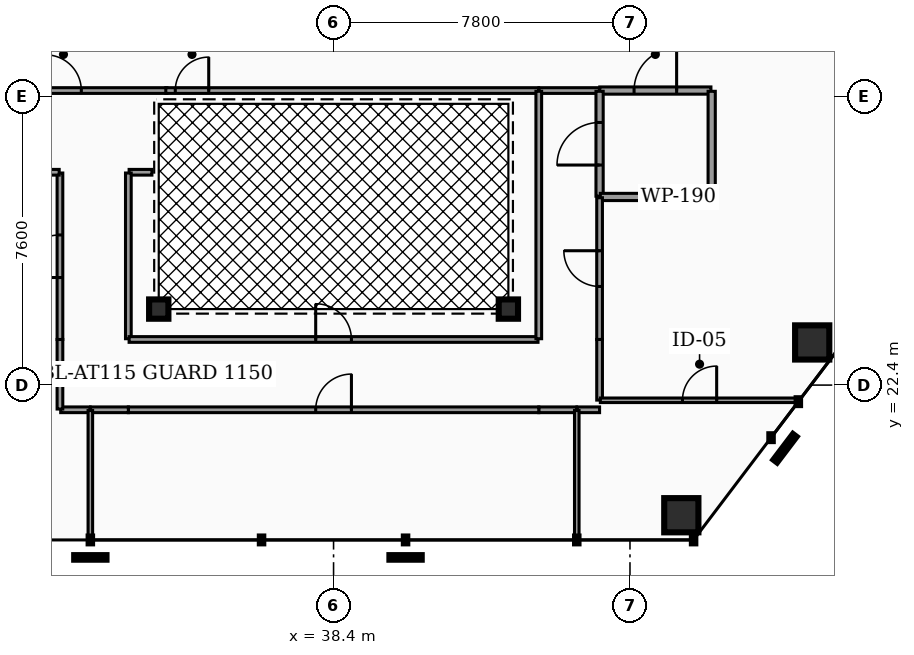
"""IFC4 building model, lengths in metres.
Left out: names, types, materials, properties, quantities, classifications, styles, units other than length and angle.
Written with IfcOpenShell. Run it as: python <this file> out.ifc"""

import sys

from ifc_helpers import new_model, si_unit, direction, frame, frame_2d, origin, origin_2d, place, context, subcontext, project, spatial, rectangle, hollow_rectangle, hollow_circle, extrude, element, fill, save


model = new_model("IFC4")
c1 = context("Model", 3, precision=1e-05, world=origin(), true_north=direction((0.0, 1.0)))
c2 = subcontext(c1, "Body", "Model", "MODEL_VIEW")
j1 = project(units=[si_unit("LENGTHUNIT", "METRE"), si_unit("PLANEANGLEUNIT", "RADIAN")], contexts=[c1])
p1 = place(None, origin())
s1 = spatial("IfcSite", under=j1, at=p1, CompositionType="ELEMENT")
p2 = place(p1, origin())
s2 = spatial("IfcBuilding", under=s1, at=p2, CompositionType="ELEMENT")
p3 = place(p2, frame((0.0, 0.0, 105.06)))
s3 = spatial("IfcBuildingStorey", under=s2, at=p3, CompositionType="ELEMENT", Elevation=105.06)
p4 = place(p3, frame((47.551, 18.976, 0.0), z_axis=(-0.08809338944, -0.03544586084, 0.995481363807), x_axis=(0.37328281943, -0.927717595348, 0.0)))
e1 = element("IfcColumn", 1, at=p4, inside=s3, PredefinedType="COLUMN", context=c2, shape_type="SweptSolid", body=[
    extrude(hollow_rectangle(XDim=0.9, YDim=0.9, WallThickness=0.045, at=origin_2d()), origin(), (0.0, 0.0, 1.0), 3.747),
])
p5 = place(p3, frame((50.995, 23.522, 0.0), z_axis=(-0.060564048009, 0.001306667702, 0.998163457911), x_axis=(-0.02156995343, -0.99976734149, 0.0)))
e2 = element("IfcColumn", 2, at=p5, inside=s3, PredefinedType="COLUMN", context=c2, shape_type="SweptSolid", body=[
    extrude(hollow_rectangle(XDim=0.9, YDim=0.9, WallThickness=0.045, at=origin_2d()), origin(), (0.0, 0.0, 1.0), 3.737),
])
for number, where, z_axis, x_axis in (
    (3, (33.8, 24.4, 0.0), (0.0, 0.0, 1.0), (1.0, 0.0, 0.0)),
    (4, (43.0, 24.4, 0.0), (0.0, 0.0, 1.0), (1.0, 0.0, 0.0)),
):
    element("IfcColumn", number, at=place(p3, frame(where, z_axis=z_axis, x_axis=x_axis)), inside=s3, PredefinedType="COLUMN", context=c2, shape_type="SweptSolid", body=[
        extrude(hollow_circle(Radius=0.254, WallThickness=0.02, at=origin_2d()), origin(), (0.0, 0.0, 1.0), 3.73),
    ])
p6 = place(p3, frame((45.405, 30.15, 0.0), z_axis=(0.0, 0.0, 1.0), x_axis=(1.0, 0.0, 0.0)))
e5 = element("IfcWall", 5, at=p6, inside=s3, PredefinedType="PARTITIONING", context=c2, shape_type="SweptSolid", body=[
    extrude(rectangle(XDim=2.925, YDim=0.19, at=frame_2d((1.462, 0.0))), origin(), (0.0, 0.0, 1.0), 2.687),
])
p7 = place(p6, frame((0.903, 0.0, 0.0)))
e6 = element("IfcOpeningElement", 6, at=p7, cuts=e5, PredefinedType="OPENING", context=c2, shape_type="SweptSolid", body=[
    extrude(rectangle(XDim=1.12, YDim=2.05, at=frame_2d((0.56, 1.025))), frame((0.0, 0.105, 0.0), z_axis=(0.0, -1.0, 0.0), x_axis=(1.0, 0.0, 0.0)), (0.0, 0.0, 1.0), 0.21),
])
p8 = place(p3, frame((43.805, 30.15, 0.0), z_axis=(0.0, 0.0, 1.0), x_axis=(1.0, 0.0, 0.0)))
e7 = element("IfcWall", 7, at=p8, inside=s3, PredefinedType="PARTITIONING", context=c2, shape_type="SweptSolid", body=[
    extrude(rectangle(XDim=1.59, YDim=0.15, at=frame_2d((0.795, 0.0))), origin(), (0.0, 0.0, 1.0), 2.687),
])
p9 = place(p3, frame((28.57, 30.15, 0.0), z_axis=(0.0, 0.0, 1.0), x_axis=(1.0, 0.0, 0.0)))
e8 = element("IfcWall", 8, at=p9, inside=s3, PredefinedType="PARTITIONING", context=c2, shape_type="SweptSolid", body=[
    extrude(rectangle(XDim=5.445, YDim=0.15, at=frame_2d((2.722, 0.0))), origin(), (0.0, 0.0, 1.0), 2.687),
])
p10 = place(p9, frame((2.252, 0.0, 0.0)))
e9 = element("IfcOpeningElement", 9, at=p10, cuts=e8, PredefinedType="OPENING", context=c2, shape_type="SweptSolid", body=[
    extrude(rectangle(XDim=0.94, YDim=2.05, at=frame_2d((0.47, 1.025))), frame((0.0, 0.085, 0.0), z_axis=(0.0, -1.0, 0.0), x_axis=(1.0, 0.0, 0.0)), (0.0, 0.0, 1.0), 0.17),
])
p11 = place(p3, frame((33.985, 30.15, 0.0), z_axis=(0.0, 0.0, 1.0), x_axis=(1.0, 0.0, 0.0)))
e10 = element("IfcWall", 10, at=p11, inside=s3, PredefinedType="PARTITIONING", context=c2, shape_type="SweptSolid", body=[
    extrude(rectangle(XDim=9.81, YDim=0.15, at=frame_2d((4.905, 0.0))), origin(), (0.0, 0.0, 1.0), 2.687),
])
p12 = place(p11, frame((0.25, 0.0, 0.0)))
e11 = element("IfcOpeningElement", 11, at=p12, cuts=e10, PredefinedType="OPENING", context=c2, shape_type="SweptSolid", body=[
    extrude(rectangle(XDim=0.88, YDim=2.05, at=frame_2d((0.44, 1.025))), frame((0.0, 0.085, 0.0), z_axis=(0.0, -1.0, 0.0), x_axis=(1.0, 0.0, 0.0)), (0.0, 0.0, 1.0), 0.17),
])
p13 = place(p3, frame((45.4, 27.37, 0.0), z_axis=(0.0, 0.0, 1.0), x_axis=(0.0, 1.0, 0.0)))
e12 = element("IfcWall", 12, at=p13, inside=s3, PredefinedType="PARTITIONING", context=c2, shape_type="SweptSolid", body=[
    extrude(rectangle(XDim=2.76, YDim=0.19, at=frame_2d((1.38, 0.0))), origin(), (0.0, 0.0, 1.0), 2.687),
])
p14 = place(p13, frame((0.82, 0.0, 0.0)))
e13 = element("IfcOpeningElement", 13, at=p14, cuts=e12, PredefinedType="OPENING", context=c2, shape_type="SweptSolid", body=[
    extrude(rectangle(XDim=1.12, YDim=2.05, at=frame_2d((0.56, 1.025))), frame((0.0, 0.105, 0.0), z_axis=(0.0, -1.0, 0.0), x_axis=(1.0, 0.0, 0.0)), (0.0, 0.0, 1.0), 0.21),
])
p15 = place(p3, frame((45.42, 27.35, 0.0), z_axis=(0.0, 0.0, 1.0), x_axis=(1.0, 0.0, 0.0)))
e14 = element("IfcWall", 14, at=p15, inside=s3, PredefinedType="PARTITIONING", context=c2, shape_type="SweptSolid", body=[
    extrude(rectangle(XDim=2.91, YDim=0.19, at=frame_2d((1.455, 0.0))), origin(), (0.0, 0.0, 1.0), 2.687),
])
p16 = place(p3, frame((48.35, 27.37, 0.0), z_axis=(0.0, 0.0, 1.0), x_axis=(0.0, 1.0, 0.0)))
e15 = element("IfcWall", 15, at=p16, inside=s3, PredefinedType="PARTITIONING", context=c2, shape_type="SweptSolid", body=[
    extrude(rectangle(XDim=2.76, YDim=0.19, at=frame_2d((1.38, 0.0))), origin(), (0.0, 0.0, 1.0), 2.687),
])
p17 = place(p3, frame((43.8, 21.75, 0.0), z_axis=(0.0, 0.0, 1.0), x_axis=(1.0, 0.0, 0.0)))
e16 = element("IfcWall", 16, at=p17, inside=s3, PredefinedType="PARTITIONING", context=c2, shape_type="SweptSolid", body=[
    extrude(rectangle(XDim=0.995, YDim=0.15, at=frame_2d((0.498, 0.0))), origin(), (0.0, 0.0, 1.0), 2.687),
])
p18 = place(p3, frame((33.0, 21.75, 0.0), z_axis=(0.0, 0.0, 1.0), x_axis=(1.0, 0.0, 0.0)))
e17 = element("IfcWall", 17, at=p18, inside=s3, PredefinedType="PARTITIONING", context=c2, shape_type="SweptSolid", body=[
    extrude(rectangle(XDim=10.8, YDim=0.15, at=frame_2d((5.4, 0.0))), origin(), (0.0, 0.0, 1.0), 2.687),
])
p19 = place(p18, frame((4.93, 0.0, 0.0)))
e18 = element("IfcOpeningElement", 18, at=p19, cuts=e17, PredefinedType="OPENING", context=c2, shape_type="SweptSolid", body=[
    extrude(rectangle(XDim=0.94, YDim=2.05, at=frame_2d((0.47, 1.025))), frame((0.0, 0.085, 0.0), z_axis=(0.0, -1.0, 0.0), x_axis=(1.0, 0.0, 0.0)), (0.0, 0.0, 1.0), 0.17),
])
p20 = place(p3, frame((32.005, 21.75, 0.0), z_axis=(0.0, 0.0, 1.0), x_axis=(1.0, 0.0, 0.0)))
e19 = element("IfcWall", 19, at=p20, inside=s3, PredefinedType="PARTITIONING", context=c2, shape_type="SweptSolid", body=[
    extrude(rectangle(XDim=0.995, YDim=0.15, at=frame_2d((0.498, 0.0))), origin(), (0.0, 0.0, 1.0), 2.687),
])
p21 = place(p3, frame((44.805, 21.75, 0.0), z_axis=(0.0, 0.0, 1.0), x_axis=(1.0, 0.0, 0.0)))
e20 = element("IfcWall", 20, at=p21, inside=s3, PredefinedType="PARTITIONING", context=c2, shape_type="SweptSolid", body=[
    extrude(rectangle(XDim=0.595, YDim=0.15, at=frame_2d((0.297, 0.0))), origin(), (0.0, 0.0, 1.0), 2.687),
])
p22 = place(p3, frame((31.22, 21.75, 0.0), z_axis=(0.0, 0.0, 1.0), x_axis=(1.0, 0.0, 0.0)))
e21 = element("IfcWall", 21, at=p22, inside=s3, PredefinedType="PARTITIONING", context=c2, shape_type="SweptSolid", body=[
    extrude(rectangle(XDim=0.775, YDim=0.15, at=frame_2d((0.388, 0.0))), origin(), (0.0, 0.0, 1.0), 2.687),
])
p23 = place(p3, frame((31.2, 21.77, 0.0), z_axis=(0.0, 0.0, 1.0), x_axis=(0.0, 1.0, 0.0)))
e22 = element("IfcWall", 22, at=p23, inside=s3, PredefinedType="PARTITIONING", context=c2, shape_type="SweptSolid", body=[
    extrude(rectangle(XDim=1.83, YDim=0.15, at=frame_2d((0.915, 0.0))), origin(), (0.0, 0.0, 1.0), 2.687),
])
p24 = place(p3, frame((31.2, 23.6, 0.0), z_axis=(0.0, 0.0, 1.0), x_axis=(0.0, 1.0, 0.0)))
e23 = element("IfcWall", 23, at=p24, inside=s3, PredefinedType="PARTITIONING", context=c2, shape_type="SweptSolid", body=[
    extrude(rectangle(XDim=4.38, YDim=0.15, at=frame_2d((2.19, 0.0))), origin(), (0.0, 0.0, 1.0), 2.687),
])
p25 = place(p24, frame((1.63, 0.0, 0.0)))
e24 = element("IfcOpeningElement", 24, at=p25, cuts=e23, PredefinedType="OPENING", context=c2, shape_type="SweptSolid", body=[
    extrude(rectangle(XDim=1.12, YDim=2.05, at=frame_2d((0.56, 1.025))), frame((0.0, 0.085, 0.0), z_axis=(0.0, -1.0, 0.0), x_axis=(1.0, 0.0, 0.0)), (0.0, 0.0, 1.0), 0.17),
])
p26 = place(p3, frame((28.55, 28.0, 0.0), z_axis=(0.0, 0.0, 1.0), x_axis=(1.0, 0.0, 0.0)))
e25 = element("IfcWall", 25, at=p26, inside=s3, PredefinedType="PARTITIONING", context=c2, shape_type="SweptSolid", body=[
    extrude(rectangle(XDim=2.63, YDim=0.15, at=frame_2d((1.315, 0.0))), origin(), (0.0, 0.0, 1.0), 2.687),
])
p27 = place(p3, frame((45.4, 23.6, 0.0), z_axis=(0.0, 0.0, 1.0), x_axis=(0.0, 1.0, 0.0)))
e26 = element("IfcWall", 26, at=p27, inside=s3, PredefinedType="PARTITIONING", context=c2, shape_type="SweptSolid", body=[
    extrude(rectangle(XDim=3.73, YDim=0.15, at=frame_2d((1.865, 0.0))), origin(), (0.0, 0.0, 1.0), 2.687),
])
p28 = place(p27, frame((1.395, 0.0, 0.0)))
e27 = element("IfcOpeningElement", 27, at=p28, cuts=e26, PredefinedType="OPENING", context=c2, shape_type="SweptSolid", body=[
    extrude(rectangle(XDim=0.94, YDim=2.05, at=frame_2d((0.47, 1.025))), frame((0.0, 0.085, 0.0), z_axis=(0.0, -1.0, 0.0), x_axis=(1.0, 0.0, 0.0)), (0.0, 0.0, 1.0), 0.17),
])
p29 = place(p3, frame((45.4, 22.005, 0.0), z_axis=(0.0, 0.0, 1.0), x_axis=(0.0, 1.0, 0.0)))
e28 = element("IfcWall", 28, at=p29, inside=s3, PredefinedType="PARTITIONING", context=c2, shape_type="SweptSolid", body=[
    extrude(rectangle(XDim=1.595, YDim=0.15, at=frame_2d((0.798, 0.0))), origin(), (0.0, 0.0, 1.0), 2.687),
])
p30 = place(p3, frame((33.02, 28.0, 0.0), z_axis=(0.0, 0.0, 1.0), x_axis=(1.0, 0.0, 0.0)))
e29 = element("IfcWall", 29, at=p30, inside=s3, PredefinedType="PARTITIONING", context=c2, shape_type="SweptSolid", body=[
    extrude(rectangle(XDim=0.6, YDim=0.15, at=frame_2d((0.3, 0.0))), origin(), (0.0, 0.0, 1.0), 2.687),
])
p31 = place(p3, frame((33.0, 23.62, 0.0), z_axis=(0.0, 0.0, 1.0), x_axis=(0.0, 1.0, 0.0)))
e30 = element("IfcWall", 30, at=p31, inside=s3, PredefinedType="PARTITIONING", context=c2, shape_type="SweptSolid", body=[
    extrude(rectangle(XDim=4.36, YDim=0.15, at=frame_2d((2.18, 0.0))), origin(), (0.0, 0.0, 1.0), 2.687),
])
p32 = place(p3, frame((33.02, 23.6, 0.0), z_axis=(0.0, 0.0, 1.0), x_axis=(1.0, 0.0, 0.0)))
e31 = element("IfcWall", 31, at=p32, inside=s3, PredefinedType="PARTITIONING", context=c2, shape_type="SweptSolid", body=[
    extrude(rectangle(XDim=10.76, YDim=0.15, at=frame_2d((5.38, 0.0))), origin(), (0.0, 0.0, 1.0), 2.687),
])
p33 = place(p32, frame((4.91, 0.0, 0.0)))
e32 = element("IfcOpeningElement", 32, at=p33, cuts=e31, PredefinedType="OPENING", context=c2, shape_type="SweptSolid", body=[
    extrude(rectangle(XDim=0.94, YDim=2.05, at=frame_2d((0.47, 1.025))), frame((0.0, 0.085, 0.0), z_axis=(0.0, -1.0, 0.0), x_axis=(1.0, 0.0, 0.0)), (0.0, 0.0, 1.0), 0.17),
])
p34 = place(p3, frame((43.8, 23.62, 0.0), z_axis=(0.0, 0.0, 1.0), x_axis=(0.0, 1.0, 0.0)))
e33 = element("IfcWall", 33, at=p34, inside=s3, PredefinedType="PARTITIONING", context=c2, shape_type="SweptSolid", body=[
    extrude(rectangle(XDim=6.51, YDim=0.15, at=frame_2d((3.255, 0.0))), origin(), (0.0, 0.0, 1.0), 2.687),
])
for number, where, z_axis, x_axis in (
    (34, (44.8, 18.341, 0.0), (0.0, 0.0, 1.0), (0.0, 1.0, 0.0)),
    (35, (32.0, 18.341, 0.0), (0.0, 0.0, 1.0), (0.0, 1.0, 0.0)),
):
    element("IfcWall", number, at=place(p3, frame(where, z_axis=z_axis, x_axis=x_axis)), inside=s3, PredefinedType="PARTITIONING", context=c2, shape_type="SweptSolid", body=[
        extrude(rectangle(XDim=3.389, YDim=0.12, at=frame_2d((1.695, 0.0))), origin(), (0.0, 0.0, 1.0), 2.687),
    ])
p35 = place(p3, frame((45.42, 22.0, 0.0), z_axis=(0.0, 0.0, 1.0), x_axis=(1.0, 0.0, 0.0)))
e36 = element("IfcWall", 36, at=p35, inside=s3, PredefinedType="PARTITIONING", context=c2, shape_type="SweptSolid", body=[
    extrude(rectangle(XDim=5.223, YDim=0.12, at=frame_2d((2.611, 0.0))), origin(), (0.0, 0.0, 1.0), 2.687),
])
p36 = place(p35, frame((2.161, 0.0, 0.0)))
e37 = element("IfcOpeningElement", 37, at=p36, cuts=e36, PredefinedType="OPENING", context=c2, shape_type="SweptSolid", body=[
    extrude(rectangle(XDim=0.9, YDim=2.05, at=frame_2d((0.45, 1.025))), frame((0.0, 0.07, 0.0), z_axis=(0.0, -1.0, 0.0), x_axis=(1.0, 0.0, 0.0)), (0.0, 0.0, 1.0), 0.14),
])
p37 = place(p7, origin())
e38 = element("IfcDoor", 38, at=p37, inside=s3, OperationType="SINGLE_SWING_RIGHT", PredefinedType="DOOR", context=c2, shape_type="SweptSolid", body=[
    extrude(rectangle(XDim=1.12, YDim=2.05, at=frame_2d((0.56, 1.025))), frame((0.0, 0.025, 0.0), z_axis=(0.0, -1.0, 0.0), x_axis=(1.0, 0.0, 0.0)), (0.0, 0.0, 1.0), 0.05),
])
fill(e6, e38)
p38 = place(p10, origin())
e39 = element("IfcDoor", 39, at=p38, inside=s3, OperationType="SINGLE_SWING_LEFT", PredefinedType="DOOR", context=c2, shape_type="SweptSolid", body=[
    extrude(rectangle(XDim=0.94, YDim=2.05, at=frame_2d((0.47, 1.025))), frame((0.0, 0.025, 0.0), z_axis=(0.0, -1.0, 0.0), x_axis=(1.0, 0.0, 0.0)), (0.0, 0.0, 1.0), 0.05),
])
fill(e9, e39)
p39 = place(p12, origin())
e40 = element("IfcDoor", 40, at=p39, inside=s3, OperationType="SINGLE_SWING_RIGHT", PredefinedType="DOOR", context=c2, shape_type="SweptSolid", body=[
    extrude(rectangle(XDim=0.88, YDim=2.05, at=frame_2d((0.44, 1.025))), frame((0.0, 0.025, 0.0), z_axis=(0.0, -1.0, 0.0), x_axis=(1.0, 0.0, 0.0)), (0.0, 0.0, 1.0), 0.05),
])
fill(e11, e40)
p40 = place(p14, origin())
e41 = element("IfcDoor", 41, at=p40, inside=s3, OperationType="SINGLE_SWING_LEFT", PredefinedType="DOOR", context=c2, shape_type="SweptSolid", body=[
    extrude(rectangle(XDim=1.12, YDim=2.05, at=frame_2d((0.56, 1.025))), frame((0.0, 0.025, 0.0), z_axis=(0.0, -1.0, 0.0), x_axis=(1.0, 0.0, 0.0)), (0.0, 0.0, 1.0), 0.05),
])
fill(e13, e41)
p41 = place(p19, origin())
e42 = element("IfcDoor", 42, at=p41, inside=s3, OperationType="SINGLE_SWING_RIGHT", PredefinedType="DOOR", context=c2, shape_type="SweptSolid", body=[
    extrude(rectangle(XDim=0.94, YDim=2.05, at=frame_2d((0.47, 1.025))), frame((0.0, 0.025, 0.0), z_axis=(0.0, -1.0, 0.0), x_axis=(1.0, 0.0, 0.0)), (0.0, 0.0, 1.0), 0.05),
])
fill(e18, e42)
p42 = place(p25, origin())
e43 = element("IfcDoor", 43, at=p42, inside=s3, OperationType="SINGLE_SWING_LEFT", PredefinedType="DOOR", context=c2, shape_type="SweptSolid", body=[
    extrude(rectangle(XDim=1.12, YDim=2.05, at=frame_2d((0.56, 1.025))), frame((0.0, 0.025, 0.0), z_axis=(0.0, -1.0, 0.0), x_axis=(1.0, 0.0, 0.0)), (0.0, 0.0, 1.0), 0.05),
])
fill(e24, e43)
p43 = place(p28, origin())
e44 = element("IfcDoor", 44, at=p43, inside=s3, OperationType="SINGLE_SWING_RIGHT", PredefinedType="DOOR", context=c2, shape_type="SweptSolid", body=[
    extrude(rectangle(XDim=0.94, YDim=2.05, at=frame_2d((0.47, 1.025))), frame((0.0, 0.025, 0.0), z_axis=(0.0, -1.0, 0.0), x_axis=(1.0, 0.0, 0.0)), (0.0, 0.0, 1.0), 0.05),
])
fill(e27, e44)
p44 = place(p33, origin())
e45 = element("IfcDoor", 45, at=p44, inside=s3, OperationType="SINGLE_SWING_LEFT", PredefinedType="DOOR", context=c2, shape_type="SweptSolid", body=[
    extrude(rectangle(XDim=0.94, YDim=2.05, at=frame_2d((0.47, 1.025))), frame((0.0, 0.025, 0.0), z_axis=(0.0, -1.0, 0.0), x_axis=(1.0, 0.0, 0.0)), (0.0, 0.0, 1.0), 0.05),
])
fill(e32, e45)
p45 = place(p36, origin())
e46 = element("IfcDoor", 46, at=p45, inside=s3, OperationType="SINGLE_SWING_RIGHT", PredefinedType="DOOR", context=c2, shape_type="SweptSolid", body=[
    extrude(rectangle(XDim=0.9, YDim=2.05, at=frame_2d((0.45, 1.025))), frame((0.0, 0.025, 0.0), z_axis=(0.0, -1.0, 0.0), x_axis=(1.0, 0.0, 0.0)), (0.0, 0.0, 1.0), 0.05),
])
fill(e37, e46)
save(model, sys.argv[1])
